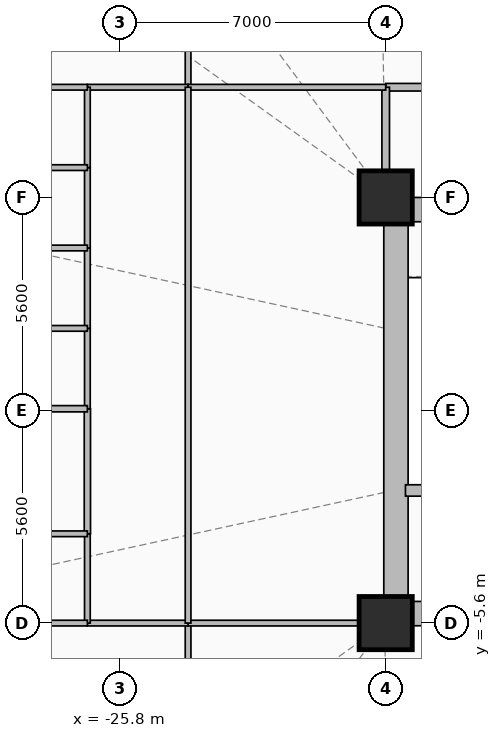
"""IFC4 building model, lengths in metres.
Left out: names, types, materials, properties, quantities, classifications, styles, units other than length and angle.
Written with IfcOpenShell. Run it as: python <this file> out.ifc"""

import sys

from ifc_helpers import new_model, si_unit, direction, frame, frame_2d, origin, origin_2d, place, context, subcontext, project, spatial, rectangle, extrude, element, fill, save


model = new_model("IFC4")
c1 = context("Model", 3, precision=1e-05, world=origin(), true_north=direction((0.0, 1.0)))
c2 = subcontext(c1, "Body", "Model", "MODEL_VIEW")
j1 = project(units=[si_unit("LENGTHUNIT", "METRE"), si_unit("PLANEANGLEUNIT", "RADIAN")], contexts=[c1])
p1 = place(None, origin())
s1 = spatial("IfcSite", under=j1, at=p1, CompositionType="ELEMENT")
p2 = place(p1, origin())
s2 = spatial("IfcBuilding", under=s1, at=p2, CompositionType="ELEMENT")
p3 = place(p2, frame((0.0, 0.0, 22.5)))
s3 = spatial("IfcBuildingStorey", under=s2, at=p3, CompositionType="ELEMENT", Elevation=22.5)
for number, where, z_axis, x_axis in (
    (1, (-18.8, -5.6, 0.0), (0.0, 0.0, 1.0), (1.0, 0.0, 0.0)),
    (2, (-18.8, 5.6, 0.0), (0.0, 0.0, 1.0), (1.0, 0.0, 0.0)),
):
    element("IfcColumn", number, at=place(p3, frame(where, z_axis=z_axis, x_axis=x_axis)), inside=s3, PredefinedType="COLUMN", context=c2, shape_type="SweptSolid", body=[
        extrude(rectangle(XDim=1.4, YDim=1.4, at=origin_2d()), origin(), (0.0, 0.0, 1.0), 4.5),
    ])
p4 = place(p3, frame((-18.8, 5.28, 0.0), z_axis=(0.0, 0.0, 1.0), x_axis=(1.0, 0.0, 0.0)))
e3 = element("IfcWall", 3, at=p4, inside=s3, PredefinedType="SHEAR", context=c2, shape_type="SweptSolid", body=[
    extrude(rectangle(XDim=9.6, YDim=0.64, at=frame_2d((4.8, 0.0))), origin(), (0.0, 0.0, 1.0), 4.16),
])
p5 = place(p4, frame((1.55, 0.0, 0.0)))
e4 = element("IfcOpeningElement", 4, at=p5, cuts=e3, PredefinedType="OPENING", context=c2, shape_type="SweptSolid", body=[
    extrude(rectangle(XDim=1.1, YDim=2.15, at=frame_2d((0.55, 1.075))), frame((0.0, 0.33, 0.0), z_axis=(0.0, -1.0, 0.0), x_axis=(1.0, 0.0, 0.0)), (0.0, 0.0, 1.0), 0.66),
])
p6 = place(p4, frame((4.775, 0.0, 0.0)))
e5 = element("IfcOpeningElement", 5, at=p6, cuts=e3, PredefinedType="OPENING", context=c2, shape_type="SweptSolid", body=[
    extrude(rectangle(XDim=1.05, YDim=2.1, at=frame_2d((0.525, 1.05))), frame((0.0, 0.33, 0.0), z_axis=(0.0, -1.0, 0.0), x_axis=(1.0, 0.0, 0.0)), (0.0, 0.0, 1.0), 0.66),
])
p7 = place(p3, frame((-18.8, -5.35, 0.0), z_axis=(0.0, 0.0, 1.0), x_axis=(1.0, 0.0, 0.0)))
e6 = element("IfcWall", 6, at=p7, inside=s3, PredefinedType="SHEAR", context=c2, shape_type="SweptSolid", body=[
    extrude(rectangle(XDim=9.6, YDim=0.64, at=frame_2d((4.8, 0.0))), origin(), (0.0, 0.0, 1.0), 4.16),
])
p8 = place(p7, frame((1.05, 0.0, 0.0)))
e7 = element("IfcOpeningElement", 7, at=p8, cuts=e6, PredefinedType="OPENING", context=c2, shape_type="SweptSolid", body=[
    extrude(rectangle(XDim=0.9, YDim=2.1, at=frame_2d((0.45, 1.05))), frame((0.0, 0.33, 0.0), z_axis=(0.0, -1.0, 0.0), x_axis=(1.0, 0.0, 0.0)), (0.0, 0.0, 1.0), 0.66),
])
p9 = place(p3, frame((-18.53, -5.05, 0.0), z_axis=(0.0, 0.0, 1.0), x_axis=(0.0, 1.0, 0.0)))
e8 = element("IfcWall", 8, at=p9, inside=s3, PredefinedType="SHEAR", context=c2, shape_type="SweptSolid", body=[
    extrude(rectangle(XDim=10.1, YDim=0.64, at=frame_2d((5.05, 0.0))), origin(), (0.0, 0.0, 1.0), 4.16),
])
p10 = place(p3, frame((-18.28, -2.11, 0.0), z_axis=(0.0, 0.0, 1.0), x_axis=(1.0, 0.0, 0.0)))
e9 = element("IfcWall", 9, at=p10, inside=s3, PredefinedType="SHEAR", context=c2, shape_type="SweptSolid", body=[
    extrude(rectangle(XDim=3.18, YDim=0.3, at=frame_2d((1.59, 0.0))), origin(), (0.0, 0.0, 1.0), 4.16),
])
p11 = place(p3, frame((-12.0, 8.5, 0.0), z_axis=(0.0, 0.0, 1.0), x_axis=(-1.0, 0.0, 0.0)))
e10 = element("IfcWall", 10, at=p11, inside=s3, PredefinedType="PARTITIONING", context=c2, shape_type="SweptSolid", body=[
    extrude(rectangle(XDim=6.8, YDim=0.2, at=frame_2d((3.4, 0.0))), origin(), (0.0, 0.0, 1.0), 4.16),
])
p12 = place(p11, frame((1.715, 0.0, 0.0)))
e11 = element("IfcOpeningElement", 11, at=p12, cuts=e10, PredefinedType="OPENING", context=c2, shape_type="SweptSolid", body=[
    extrude(rectangle(XDim=1.1, YDim=2.15, at=frame_2d((0.55, 1.075))), frame((0.0, 0.11, 0.0), z_axis=(0.0, -1.0, 0.0), x_axis=(1.0, 0.0, 0.0)), (0.0, 0.0, 1.0), 0.22),
])
p13 = place(p3, frame((-18.8, 8.5, 0.0), z_axis=(0.0, 0.0, 1.0), x_axis=(0.0, -1.0, 0.0)))
e12 = element("IfcWall", 12, at=p13, inside=s3, PredefinedType="PARTITIONING", context=c2, shape_type="SweptSolid", body=[
    extrude(rectangle(XDim=2.9, YDim=0.2, at=frame_2d((1.45, 0.0))), origin(), (0.0, 0.0, 1.0), 3.645),
])
p14 = place(p3, frame((-24.0, 8.5, 0.0), z_axis=(0.0, 0.0, 1.0), x_axis=(0.0, 1.0, 0.0)))
e13 = element("IfcWall", 13, at=p14, inside=s3, PredefinedType="PARTITIONING", context=c2, shape_type="SweptSolid", body=[
    extrude(rectangle(XDim=2.15, YDim=0.15, at=frame_2d((1.075, 0.0))), origin(), (0.0, 0.0, 1.0), 4.16),
])
p15 = place(p14, frame((0.625, 0.0, 0.0)))
e14 = element("IfcOpeningElement", 14, at=p15, cuts=e13, PredefinedType="OPENING", context=c2, shape_type="SweptSolid", body=[
    extrude(rectangle(XDim=0.9, YDim=2.1, at=frame_2d((0.45, 1.05))), frame((0.0, 0.085, 0.0), z_axis=(0.0, -1.0, 0.0), x_axis=(1.0, 0.0, 0.0)), (0.0, 0.0, 1.0), 0.17),
])
p16 = place(p3, frame((-18.8, 8.5, 0.0), z_axis=(0.0, 0.0, 1.0), x_axis=(-1.0, 0.0, 0.0)))
e15 = element("IfcWall", 15, at=p16, inside=s3, PredefinedType="PARTITIONING", context=c2, shape_type="SweptSolid", body=[
    extrude(rectangle(XDim=5.2, YDim=0.15, at=frame_2d((2.6, 0.0))), origin(), (0.0, 0.0, 1.0), 4.16),
])
p17 = place(p16, frame((3.196, 0.0, 0.0)))
e16 = element("IfcOpeningElement", 16, at=p17, cuts=e15, PredefinedType="OPENING", context=c2, shape_type="SweptSolid", body=[
    extrude(rectangle(XDim=1.05, YDim=2.15, at=frame_2d((0.525, 1.075))), frame((0.0, 0.085, 0.0), z_axis=(0.0, -1.0, 0.0), x_axis=(1.0, 0.0, 0.0)), (0.0, 0.0, 1.0), 0.17),
])
p18 = place(p3, frame((-24.0, -7.75, 0.0), z_axis=(0.0, 0.0, 1.0), x_axis=(0.0, 1.0, 0.0)))
e17 = element("IfcWall", 17, at=p18, inside=s3, PredefinedType="PARTITIONING", context=c2, shape_type="SweptSolid", body=[
    extrude(rectangle(XDim=2.15, YDim=0.15, at=frame_2d((1.075, 0.0))), origin(), (0.0, 0.0, 1.0), 4.16),
])
p19 = place(p18, frame((0.625, 0.0, 0.0)))
e18 = element("IfcOpeningElement", 18, at=p19, cuts=e17, PredefinedType="OPENING", context=c2, shape_type="SweptSolid", body=[
    extrude(rectangle(XDim=0.9, YDim=2.1, at=frame_2d((0.45, 1.05))), frame((0.0, 0.085, 0.0), z_axis=(0.0, -1.0, 0.0), x_axis=(1.0, 0.0, 0.0)), (0.0, 0.0, 1.0), 0.17),
])
p20 = place(p3, frame((-24.0, -5.6, 0.0), z_axis=(0.0, 0.0, 1.0), x_axis=(1.0, 0.0, 0.0)))
e19 = element("IfcWall", 19, at=p20, inside=s3, PredefinedType="PARTITIONING", context=c2, shape_type="SweptSolid", body=[
    extrude(rectangle(XDim=5.2, YDim=0.15, at=frame_2d((2.6, 0.0))), origin(), (0.0, 0.0, 1.0), 4.16),
])
p21 = place(p3, frame((-26.65, 8.5, 0.0), z_axis=(0.0, 0.0, 1.0), x_axis=(1.0, 0.0, 0.0)))
e20 = element("IfcWall", 20, at=p21, inside=s3, PredefinedType="PARTITIONING", context=c2, shape_type="SweptSolid", body=[
    extrude(rectangle(XDim=2.65, YDim=0.15, at=frame_2d((1.325, 0.0))), origin(), (0.0, 0.0, 1.0), 4.16),
])
p22 = place(p21, frame((0.635, 0.0, 0.0)))
e21 = element("IfcOpeningElement", 21, at=p22, cuts=e20, PredefinedType="OPENING", context=c2, shape_type="SweptSolid", body=[
    extrude(rectangle(XDim=1.05, YDim=2.15, at=frame_2d((0.525, 1.075))), frame((0.0, 0.085, 0.0), z_axis=(0.0, -1.0, 0.0), x_axis=(1.0, 0.0, 0.0)), (0.0, 0.0, 1.0), 0.17),
])
p23 = place(p3, frame((-24.0, -5.6, 0.0), z_axis=(0.0, 0.0, 1.0), x_axis=(-1.0, 0.0, 0.0)))
e22 = element("IfcWall", 22, at=p23, inside=s3, PredefinedType="PARTITIONING", context=c2, shape_type="SweptSolid", body=[
    extrude(rectangle(XDim=2.65, YDim=0.15, at=frame_2d((1.325, 0.0))), origin(), (0.0, 0.0, 1.0), 4.16),
])
p24 = place(p23, frame((0.965, 0.0, 0.0)))
e23 = element("IfcOpeningElement", 23, at=p24, cuts=e22, PredefinedType="OPENING", context=c2, shape_type="SweptSolid", body=[
    extrude(rectangle(XDim=1.05, YDim=2.15, at=frame_2d((0.525, 1.075))), frame((0.0, 0.085, 0.0), z_axis=(0.0, -1.0, 0.0), x_axis=(1.0, 0.0, 0.0)), (0.0, 0.0, 1.0), 0.17),
])
p25 = place(p3, frame((-26.65, -5.6, 0.0), z_axis=(0.0, 0.0, 1.0), x_axis=(0.0, 1.0, 0.0)))
e24 = element("IfcWall", 24, at=p25, inside=s3, PredefinedType="PLUMBINGWALL", context=c2, shape_type="SweptSolid", body=[
    extrude(rectangle(XDim=2.35, YDim=0.15, at=frame_2d((1.175, 0.0))), origin(), (0.0, 0.0, 1.0), 4.16),
])
p26 = place(p25, frame((0.834, 0.0, 0.0)))
e25 = element("IfcOpeningElement", 25, at=p26, cuts=e24, PredefinedType="OPENING", context=c2, shape_type="SweptSolid", body=[
    extrude(rectangle(XDim=0.9, YDim=2.1, at=frame_2d((0.45, 1.05))), frame((0.0, 0.085, 0.0), z_axis=(0.0, -1.0, 0.0), x_axis=(1.0, 0.0, 0.0)), (0.0, 0.0, 1.0), 0.17),
])
p27 = place(p3, frame((-26.65, -3.25, 0.0), z_axis=(0.0, 0.0, 1.0), x_axis=(0.0, 1.0, 0.0)))
e26 = element("IfcWall", 26, at=p27, inside=s3, PredefinedType="PARTITIONING", context=c2, shape_type="SweptSolid", body=[
    extrude(rectangle(XDim=3.29, YDim=0.165, at=frame_2d((1.645, 0.0))), origin(), (0.0, 0.0, 1.0), 4.16),
])
p28 = place(p27, frame((1.438, 0.0, 0.0)))
e27 = element("IfcOpeningElement", 27, at=p28, cuts=e26, PredefinedType="OPENING", context=c2, shape_type="SweptSolid", body=[
    extrude(rectangle(XDim=1.15, YDim=2.15, at=frame_2d((0.575, 1.075))), frame((0.0, 0.093, 0.0), z_axis=(0.0, -1.0, 0.0), x_axis=(1.0, 0.0, 0.0)), (0.0, 0.0, 1.0), 0.185),
])
p29 = place(p3, frame((-26.65, 0.04, 0.0), z_axis=(0.0, 0.0, 1.0), x_axis=(0.0, 1.0, 0.0)))
e28 = element("IfcWall", 28, at=p29, inside=s3, PredefinedType="PARTITIONING", context=c2, shape_type="SweptSolid", body=[
    extrude(rectangle(XDim=2.115, YDim=0.15, at=frame_2d((1.058, 0.0))), origin(), (0.0, 0.0, 1.0), 4.16),
])
p30 = place(p29, frame((0.583, 0.0, 0.0)))
e29 = element("IfcOpeningElement", 29, at=p30, cuts=e28, PredefinedType="OPENING", context=c2, shape_type="SweptSolid", body=[
    extrude(rectangle(XDim=0.95, YDim=2.1, at=frame_2d((0.475, 1.05))), frame((0.0, 0.085, 0.0), z_axis=(0.0, -1.0, 0.0), x_axis=(1.0, 0.0, 0.0)), (0.0, 0.0, 1.0), 0.17),
])
p31 = place(p3, frame((-26.65, 2.155, 0.0), z_axis=(0.0, 0.0, 1.0), x_axis=(0.0, 1.0, 0.0)))
e30 = element("IfcWall", 30, at=p31, inside=s3, PredefinedType="PARTITIONING", context=c2, shape_type="SweptSolid", body=[
    extrude(rectangle(XDim=2.115, YDim=0.15, at=frame_2d((1.058, 0.0))), origin(), (0.0, 0.0, 1.0), 4.16),
])
p32 = place(p31, frame((0.583, 0.0, 0.0)))
e31 = element("IfcOpeningElement", 31, at=p32, cuts=e30, PredefinedType="OPENING", context=c2, shape_type="SweptSolid", body=[
    extrude(rectangle(XDim=0.95, YDim=2.1, at=frame_2d((0.475, 1.05))), frame((0.0, 0.085, 0.0), z_axis=(0.0, -1.0, 0.0), x_axis=(1.0, 0.0, 0.0)), (0.0, 0.0, 1.0), 0.17),
])
p33 = place(p3, frame((-26.65, 4.27, 0.0), z_axis=(0.0, 0.0, 1.0), x_axis=(0.0, 1.0, 0.0)))
e32 = element("IfcWall", 32, at=p33, inside=s3, PredefinedType="PARTITIONING", context=c2, shape_type="SweptSolid", body=[
    extrude(rectangle(XDim=2.115, YDim=0.15, at=frame_2d((1.058, 0.0))), origin(), (0.0, 0.0, 1.0), 4.16),
])
p34 = place(p33, frame((0.583, 0.0, 0.0)))
e33 = element("IfcOpeningElement", 33, at=p34, cuts=e32, PredefinedType="OPENING", context=c2, shape_type="SweptSolid", body=[
    extrude(rectangle(XDim=0.95, YDim=2.1, at=frame_2d((0.475, 1.05))), frame((0.0, 0.085, 0.0), z_axis=(0.0, -1.0, 0.0), x_axis=(1.0, 0.0, 0.0)), (0.0, 0.0, 1.0), 0.17),
])
p35 = place(p3, frame((-26.65, 6.385, 0.0), z_axis=(0.0, 0.0, 1.0), x_axis=(0.0, 1.0, 0.0)))
e34 = element("IfcWall", 34, at=p35, inside=s3, PredefinedType="PARTITIONING", context=c2, shape_type="SweptSolid", body=[
    extrude(rectangle(XDim=2.115, YDim=0.15, at=frame_2d((1.058, 0.0))), origin(), (0.0, 0.0, 1.0), 4.16),
])
p36 = place(p35, frame((0.583, 0.0, 0.0)))
e35 = element("IfcOpeningElement", 35, at=p36, cuts=e34, PredefinedType="OPENING", context=c2, shape_type="SweptSolid", body=[
    extrude(rectangle(XDim=0.95, YDim=2.1, at=frame_2d((0.475, 1.05))), frame((0.0, 0.085, 0.0), z_axis=(0.0, -1.0, 0.0), x_axis=(1.0, 0.0, 0.0)), (0.0, 0.0, 1.0), 0.17),
])
p37 = place(p3, frame((-24.0, 8.5, 0.0), z_axis=(0.0, 0.0, 1.0), x_axis=(0.0, -1.0, 0.0)))
e36 = element("IfcWall", 36, at=p37, inside=s3, PredefinedType="PARTITIONING", context=c2, shape_type="SweptSolid", body=[
    extrude(rectangle(XDim=14.1, YDim=0.15, at=frame_2d((7.05, 0.0))), origin(), (0.0, 0.0, 1.0), 4.16),
])
p38 = place(p3, frame((-26.65, 8.5, 0.0), z_axis=(0.0, 0.0, 1.0), x_axis=(-1.0, 0.0, 0.0)))
e37 = element("IfcWall", 37, at=p38, inside=s3, PredefinedType="PARTITIONING", context=c2, shape_type="SweptSolid", body=[
    extrude(rectangle(XDim=3.54, YDim=0.15, at=frame_2d((1.77, 0.0))), origin(), (0.0, 0.0, 1.0), 4.16),
])
for number, where, z_axis, x_axis in (
    (38, (-29.85, -5.6, 0.0), (0.0, 0.0, 1.0), (1.0, 0.0, 0.0)),
    (39, (-29.85, -3.25, 0.0), (0.0, 0.0, 1.0), (1.0, 0.0, 0.0)),
):
    element("IfcWall", number, at=place(p3, frame(where, z_axis=z_axis, x_axis=x_axis)), inside=s3, PredefinedType="PLUMBINGWALL", context=c2, shape_type="SweptSolid", body=[
        extrude(rectangle(XDim=3.2, YDim=0.15, at=frame_2d((1.6, 0.0))), origin(), (0.0, 0.0, 1.0), 4.16),
    ])
p39 = place(p3, frame((-36.8, 0.04, 0.0), z_axis=(0.0, 0.0, 1.0), x_axis=(1.0, 0.0, 0.0)))
e40 = element("IfcWall", 40, at=p39, inside=s3, PredefinedType="PARTITIONING", context=c2, shape_type="SweptSolid", body=[
    extrude(rectangle(XDim=10.15, YDim=0.165, at=frame_2d((5.075, 0.0))), origin(), (0.0, 0.0, 1.0), 4.16),
])
p40 = place(p3, frame((-36.8, 2.155, 0.0), z_axis=(0.0, 0.0, 1.0), x_axis=(1.0, 0.0, 0.0)))
e41 = element("IfcWall", 41, at=p40, inside=s3, PredefinedType="PARTITIONING", context=c2, shape_type="SweptSolid", body=[
    extrude(rectangle(XDim=10.15, YDim=0.15, at=frame_2d((5.075, 0.0))), origin(), (0.0, 0.0, 1.0), 4.16),
])
p41 = place(p3, frame((-36.8, 4.27, 0.0), z_axis=(0.0, 0.0, 1.0), x_axis=(1.0, 0.0, 0.0)))
e42 = element("IfcWall", 42, at=p41, inside=s3, PredefinedType="PARTITIONING", context=c2, shape_type="SweptSolid", body=[
    extrude(rectangle(XDim=10.15, YDim=0.15, at=frame_2d((5.075, 0.0))), origin(), (0.0, 0.0, 1.0), 3.645),
])
p42 = place(p3, frame((-36.8, 6.385, 0.0), z_axis=(0.0, 0.0, 1.0), x_axis=(1.0, 0.0, 0.0)))
e43 = element("IfcWall", 43, at=p42, inside=s3, PredefinedType="PARTITIONING", context=c2, shape_type="SweptSolid", body=[
    extrude(rectangle(XDim=10.15, YDim=0.15, at=frame_2d((5.075, 0.0))), origin(), (0.0, 0.0, 1.0), 3.545),
])
p43 = place(p15, origin())
e44 = element("IfcDoor", 44, at=p43, inside=s3, OperationType="SINGLE_SWING_LEFT", PredefinedType="DOOR", context=c2, shape_type="SweptSolid", body=[
    extrude(rectangle(XDim=0.9, YDim=2.1, at=frame_2d((0.45, 1.05))), frame((0.0, 0.025, 0.0), z_axis=(0.0, -1.0, 0.0), x_axis=(1.0, 0.0, 0.0)), (0.0, 0.0, 1.0), 0.05),
])
fill(e14, e44)
p44 = place(p17, origin())
e45 = element("IfcDoor", 45, at=p44, inside=s3, OperationType="SINGLE_SWING_RIGHT", PredefinedType="DOOR", context=c2, shape_type="SweptSolid", body=[
    extrude(rectangle(XDim=1.05, YDim=2.15, at=frame_2d((0.525, 1.075))), frame((0.0, 0.025, 0.0), z_axis=(0.0, -1.0, 0.0), x_axis=(1.0, 0.0, 0.0)), (0.0, 0.0, 1.0), 0.05),
])
fill(e16, e45)
p45 = place(p19, origin())
e46 = element("IfcDoor", 46, at=p45, inside=s3, OperationType="SINGLE_SWING_RIGHT", PredefinedType="DOOR", context=c2, shape_type="SweptSolid", body=[
    extrude(rectangle(XDim=0.9, YDim=2.1, at=frame_2d((0.45, 1.05))), frame((0.0, 0.025, 0.0), z_axis=(0.0, -1.0, 0.0), x_axis=(1.0, 0.0, 0.0)), (0.0, 0.0, 1.0), 0.05),
])
fill(e18, e46)
p46 = place(p22, origin())
e47 = element("IfcDoor", 47, at=p46, inside=s3, OperationType="SINGLE_SWING_RIGHT", PredefinedType="DOOR", context=c2, shape_type="SweptSolid", body=[
    extrude(rectangle(XDim=1.05, YDim=2.15, at=frame_2d((0.525, 1.075))), frame((0.0, 0.025, 0.0), z_axis=(0.0, -1.0, 0.0), x_axis=(1.0, 0.0, 0.0)), (0.0, 0.0, 1.0), 0.05),
])
fill(e21, e47)
p47 = place(p24, origin())
e48 = element("IfcDoor", 48, at=p47, inside=s3, OperationType="SINGLE_SWING_LEFT", PredefinedType="DOOR", context=c2, shape_type="SweptSolid", body=[
    extrude(rectangle(XDim=1.05, YDim=2.15, at=frame_2d((0.525, 1.075))), frame((0.0, 0.025, 0.0), z_axis=(0.0, -1.0, 0.0), x_axis=(1.0, 0.0, 0.0)), (0.0, 0.0, 1.0), 0.05),
])
fill(e23, e48)
p48 = place(p26, origin())
e49 = element("IfcDoor", 49, at=p48, inside=s3, OperationType="SINGLE_SWING_RIGHT", PredefinedType="DOOR", context=c2, shape_type="SweptSolid", body=[
    extrude(rectangle(XDim=0.9, YDim=2.1, at=frame_2d((0.45, 1.05))), frame((0.0, 0.025, 0.0), z_axis=(0.0, -1.0, 0.0), x_axis=(1.0, 0.0, 0.0)), (0.0, 0.0, 1.0), 0.05),
])
fill(e25, e49)
p49 = place(p28, origin())
e50 = element("IfcDoor", 50, at=p49, inside=s3, OperationType="SINGLE_SWING_LEFT", PredefinedType="DOOR", context=c2, shape_type="SweptSolid", body=[
    extrude(rectangle(XDim=1.15, YDim=2.15, at=frame_2d((0.575, 1.075))), frame((0.0, 0.025, 0.0), z_axis=(0.0, -1.0, 0.0), x_axis=(1.0, 0.0, 0.0)), (0.0, 0.0, 1.0), 0.05),
])
fill(e27, e50)
p50 = place(p30, origin())
e51 = element("IfcDoor", 51, at=p50, inside=s3, OperationType="SINGLE_SWING_RIGHT", PredefinedType="DOOR", context=c2, shape_type="SweptSolid", body=[
    extrude(rectangle(XDim=0.95, YDim=2.1, at=frame_2d((0.475, 1.05))), frame((0.0, 0.025, 0.0), z_axis=(0.0, -1.0, 0.0), x_axis=(1.0, 0.0, 0.0)), (0.0, 0.0, 1.0), 0.05),
])
fill(e29, e51)
p51 = place(p32, origin())
e52 = element("IfcDoor", 52, at=p51, inside=s3, OperationType="SINGLE_SWING_LEFT", PredefinedType="DOOR", context=c2, shape_type="SweptSolid", body=[
    extrude(rectangle(XDim=0.95, YDim=2.1, at=frame_2d((0.475, 1.05))), frame((0.0, 0.025, 0.0), z_axis=(0.0, -1.0, 0.0), x_axis=(1.0, 0.0, 0.0)), (0.0, 0.0, 1.0), 0.05),
])
fill(e31, e52)
p52 = place(p34, origin())
e53 = element("IfcDoor", 53, at=p52, inside=s3, OperationType="SINGLE_SWING_RIGHT", PredefinedType="DOOR", context=c2, shape_type="SweptSolid", body=[
    extrude(rectangle(XDim=0.95, YDim=2.1, at=frame_2d((0.475, 1.05))), frame((0.0, 0.025, 0.0), z_axis=(0.0, -1.0, 0.0), x_axis=(1.0, 0.0, 0.0)), (0.0, 0.0, 1.0), 0.05),
])
fill(e33, e53)
p53 = place(p36, origin())
e54 = element("IfcDoor", 54, at=p53, inside=s3, OperationType="SINGLE_SWING_LEFT", PredefinedType="DOOR", context=c2, shape_type="SweptSolid", body=[
    extrude(rectangle(XDim=0.95, YDim=2.1, at=frame_2d((0.475, 1.05))), frame((0.0, 0.025, 0.0), z_axis=(0.0, -1.0, 0.0), x_axis=(1.0, 0.0, 0.0)), (0.0, 0.0, 1.0), 0.05),
])
fill(e35, e54)
save(model, sys.argv[1])
